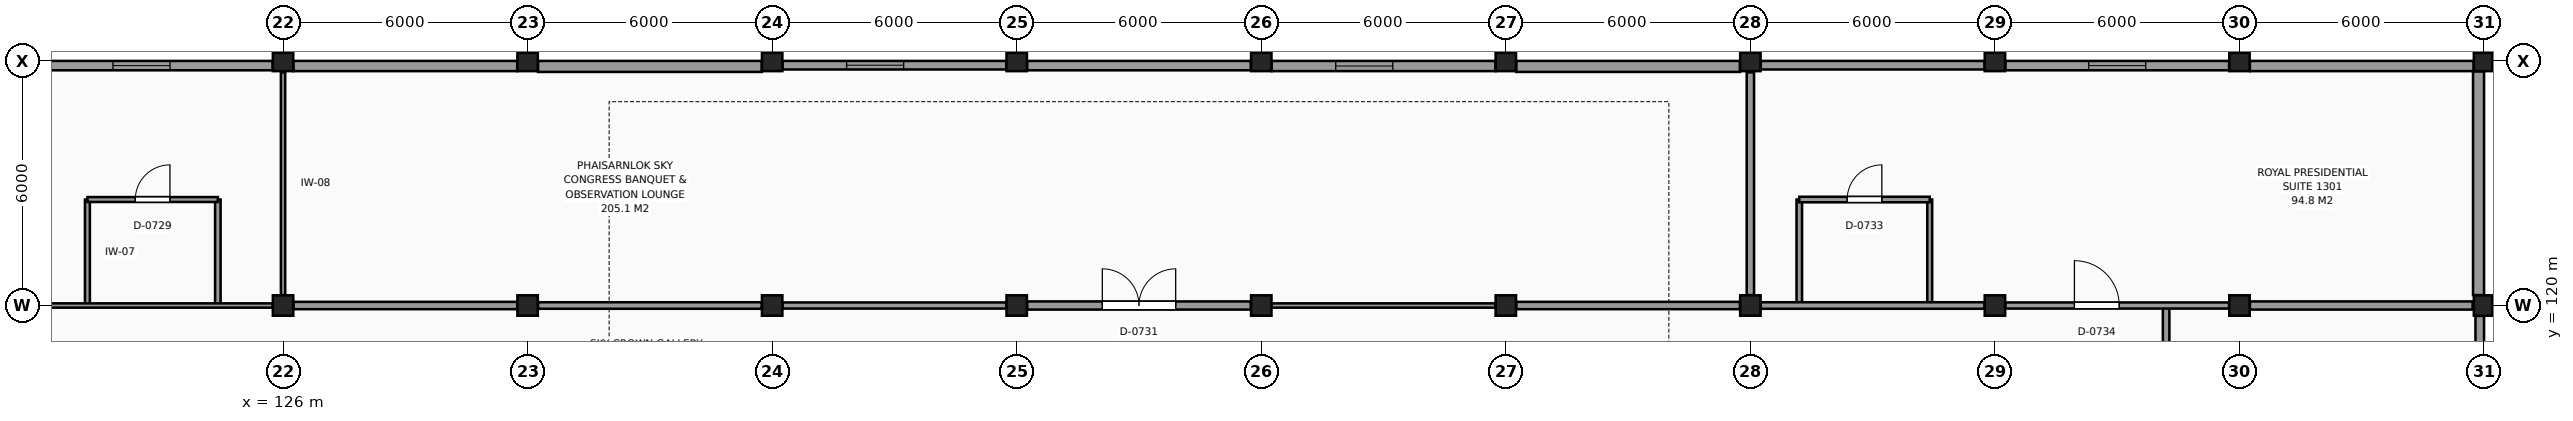
"""IFC4 building model, lengths in metres.
Left out: names, types, materials, properties, quantities, classifications, styles, units other than length and angle.
Written with IfcOpenShell. Run it as: python <this file> out.ifc"""

import sys

from ifc_helpers import new_model, si_unit, direction, frame, frame_2d, origin, origin_2d, place, context, subcontext, project, spatial, rectangle, extrude, element, fill, save


model = new_model("IFC4")
c1 = context("Model", 3, precision=1e-05, world=origin(), true_north=direction((0.0, 1.0)))
c2 = subcontext(c1, "Body", "Model", "MODEL_VIEW")
j1 = project(units=[si_unit("LENGTHUNIT", "METRE"), si_unit("PLANEANGLEUNIT", "RADIAN")], contexts=[c1])
p1 = place(None, origin())
s1 = spatial("IfcSite", under=j1, at=p1, CompositionType="ELEMENT")
p2 = place(p1, origin())
s2 = spatial("IfcBuilding", under=s1, at=p2, CompositionType="ELEMENT")
p3 = place(p2, frame((0.0, 0.0, 51.3)))
s3 = spatial("IfcBuildingStorey", under=s2, at=p3, CompositionType="ELEMENT", Elevation=51.3)
for number, where, z_axis, x_axis in (
    (1, (126.0, 120.0, 0.0), (0.0, 0.0, 1.0), (1.0, 0.0, 0.0)),
    (2, (126.0, 126.0, 0.0), (0.0, 0.0, 1.0), (1.0, 0.0, 0.0)),
    (3, (132.0, 120.0, 0.0), (0.0, 0.0, 1.0), (1.0, 0.0, 0.0)),
    (4, (132.0, 126.0, 0.0), (0.0, 0.0, 1.0), (1.0, 0.0, 0.0)),
    (5, (138.0, 120.0, 0.0), (0.0, 0.0, 1.0), (1.0, 0.0, 0.0)),
    (6, (138.0, 126.0, 0.0), (0.0, 0.0, 1.0), (1.0, 0.0, 0.0)),
    (7, (144.0, 120.0, 0.0), (0.0, 0.0, 1.0), (1.0, 0.0, 0.0)),
    (8, (144.0, 126.0, 0.0), (0.0, 0.0, 1.0), (1.0, 0.0, 0.0)),
    (9, (150.0, 120.0, 0.0), (0.0, 0.0, 1.0), (1.0, 0.0, 0.0)),
    (10, (150.0, 126.0, 0.0), (0.0, 0.0, 1.0), (1.0, 0.0, 0.0)),
    (11, (156.0, 120.0, 0.0), (0.0, 0.0, 1.0), (1.0, 0.0, 0.0)),
    (12, (156.0, 126.0, 0.0), (0.0, 0.0, 1.0), (1.0, 0.0, 0.0)),
    (13, (162.0, 120.0, 0.0), (0.0, 0.0, 1.0), (1.0, 0.0, 0.0)),
    (14, (162.0, 126.0, 0.0), (0.0, 0.0, 1.0), (1.0, 0.0, 0.0)),
    (15, (168.0, 120.0, 0.0), (0.0, 0.0, 1.0), (1.0, 0.0, 0.0)),
    (16, (168.0, 126.0, 0.0), (0.0, 0.0, 1.0), (1.0, 0.0, 0.0)),
    (17, (174.0, 120.0, 0.0), (0.0, 0.0, 1.0), (1.0, 0.0, 0.0)),
    (18, (174.0, 126.0, 0.0), (0.0, 0.0, 1.0), (1.0, 0.0, 0.0)),
    (19, (180.0, 120.0, 0.0), (0.0, 0.0, 1.0), (1.0, 0.0, 0.0)),
    (20, (180.0, 126.0, 0.0), (0.0, 0.0, 1.0), (1.0, 0.0, 0.0)),
):
    element("IfcColumn", number, at=place(p3, frame(where, z_axis=z_axis, x_axis=x_axis)), inside=s3, PredefinedType="COLUMN", context=c2, shape_type="SweptSolid", body=[
        extrude(rectangle(XDim=0.5, YDim=0.5, at=origin_2d()), origin(), (0.0, 0.0, 1.0), 3.3),
    ])
p4 = place(p3, frame((179.895, 114.255, 0.0), z_axis=(0.0, 0.0, 1.0), x_axis=(0.0, 1.0, 0.0)))
e21 = element("IfcWall", 21, at=p4, inside=s3, PredefinedType="SOLIDWALL", context=c2, shape_type="SweptSolid", body=[
    extrude(rectangle(XDim=5.49, YDim=0.21, at=frame_2d((2.745, 0.0))), origin(), (0.0, 0.0, 1.0), 2.61),
])
p5 = place(p3, frame((179.865, 120.255, 0.0), z_axis=(0.0, 0.0, 1.0), x_axis=(0.0, 1.0, 0.0)))
e22 = element("IfcWall", 22, at=p5, inside=s3, PredefinedType="SOLIDWALL", context=c2, shape_type="SweptSolid", body=[
    extrude(rectangle(XDim=5.49, YDim=0.27, at=frame_2d((2.745, 0.0))), origin(), (0.0, 0.0, 1.0), 2.46),
])
p6 = place(p3, frame((179.745, 125.875, 0.0), z_axis=(0.0, 0.0, 1.0), x_axis=(-1.0, 0.0, 0.0)))
e23 = element("IfcWall", 23, at=p6, inside=s3, PredefinedType="SOLIDWALL", context=c2, shape_type="SweptSolid", body=[
    extrude(rectangle(XDim=5.49, YDim=0.25, at=frame_2d((2.745, 0.0))), origin(), (0.0, 0.0, 1.0), 2.62),
])
p7 = place(p3, frame((173.745, 125.885, 0.0), z_axis=(0.0, 0.0, 1.0), x_axis=(-1.0, 0.0, 0.0)))
e24 = element("IfcWall", 24, at=p7, inside=s3, PredefinedType="SOLIDWALL", context=c2, shape_type="SweptSolid", body=[
    extrude(rectangle(XDim=5.49, YDim=0.23, at=frame_2d((2.745, 0.0))), origin(), (0.0, 0.0, 1.0), 2.51),
])
p8 = place(p7, frame((2.045, 0.0, 0.8)))
e25 = element("IfcOpeningElement", 25, at=p8, cuts=e24, PredefinedType="OPENING", context=c2, shape_type="SweptSolid", body=[
    extrude(rectangle(XDim=1.4, YDim=1.4, at=frame_2d((0.7, 0.7))), frame((0.0, 0.125, 0.0), z_axis=(0.0, -1.0, 0.0), x_axis=(1.0, 0.0, 0.0)), (0.0, 0.0, 1.0), 0.25),
])
p9 = place(p3, frame((167.745, 125.895, 0.0), z_axis=(0.0, 0.0, 1.0), x_axis=(-1.0, 0.0, 0.0)))
e26 = element("IfcWall", 26, at=p9, inside=s3, PredefinedType="SOLIDWALL", context=c2, shape_type="SweptSolid", body=[
    extrude(rectangle(XDim=5.49, YDim=0.21, at=frame_2d((2.745, 0.0))), origin(), (0.0, 0.0, 1.0), 2.62),
])
p10 = place(p3, frame((161.745, 125.865, 0.0), z_axis=(0.0, 0.0, 1.0), x_axis=(-1.0, 0.0, 0.0)))
e27 = element("IfcWall", 27, at=p10, inside=s3, PredefinedType="SOLIDWALL", context=c2, shape_type="SweptSolid", body=[
    extrude(rectangle(XDim=5.49, YDim=0.27, at=frame_2d((2.745, 0.0))), origin(), (0.0, 0.0, 1.0), 2.51),
])
p11 = place(p3, frame((155.745, 125.875, 0.0), z_axis=(0.0, 0.0, 1.0), x_axis=(-1.0, 0.0, 0.0)))
e28 = element("IfcWall", 28, at=p11, inside=s3, PredefinedType="SOLIDWALL", context=c2, shape_type="SweptSolid", body=[
    extrude(rectangle(XDim=5.49, YDim=0.25, at=frame_2d((2.745, 0.0))), origin(), (0.0, 0.0, 1.0), 2.62),
])
p12 = place(p11, frame((2.518, 0.0, 0.8)))
e29 = element("IfcOpeningElement", 29, at=p12, cuts=e28, PredefinedType="OPENING", context=c2, shape_type="SweptSolid", body=[
    extrude(rectangle(XDim=1.4, YDim=1.4, at=frame_2d((0.7, 0.7))), frame((0.0, 0.135, 0.0), z_axis=(0.0, -1.0, 0.0), x_axis=(1.0, 0.0, 0.0)), (0.0, 0.0, 1.0), 0.27),
])
p13 = place(p3, frame((149.745, 125.885, 0.0), z_axis=(0.0, 0.0, 1.0), x_axis=(-1.0, 0.0, 0.0)))
e30 = element("IfcWall", 30, at=p13, inside=s3, PredefinedType="SOLIDWALL", context=c2, shape_type="SweptSolid", body=[
    extrude(rectangle(XDim=5.49, YDim=0.23, at=frame_2d((2.745, 0.0))), origin(), (0.0, 0.0, 1.0), 2.51),
])
p14 = place(p3, frame((143.745, 125.895, 0.0), z_axis=(0.0, 0.0, 1.0), x_axis=(-1.0, 0.0, 0.0)))
e31 = element("IfcWall", 31, at=p14, inside=s3, PredefinedType="SOLIDWALL", context=c2, shape_type="SweptSolid", body=[
    extrude(rectangle(XDim=5.49, YDim=0.21, at=frame_2d((2.745, 0.0))), origin(), (0.0, 0.0, 1.0), 2.62),
])
p15 = place(p14, frame((2.518, 0.0, 0.8)))
e32 = element("IfcOpeningElement", 32, at=p15, cuts=e31, PredefinedType="OPENING", context=c2, shape_type="SweptSolid", body=[
    extrude(rectangle(XDim=1.4, YDim=1.4, at=frame_2d((0.7, 0.7))), frame((0.0, 0.115, 0.0), z_axis=(0.0, -1.0, 0.0), x_axis=(1.0, 0.0, 0.0)), (0.0, 0.0, 1.0), 0.23),
])
p16 = place(p3, frame((137.745, 125.865, 0.0), z_axis=(0.0, 0.0, 1.0), x_axis=(-1.0, 0.0, 0.0)))
e33 = element("IfcWall", 33, at=p16, inside=s3, PredefinedType="SOLIDWALL", context=c2, shape_type="SweptSolid", body=[
    extrude(rectangle(XDim=5.49, YDim=0.27, at=frame_2d((2.745, 0.0))), origin(), (0.0, 0.0, 1.0), 2.51),
])
p17 = place(p3, frame((131.745, 125.875, 0.0), z_axis=(0.0, 0.0, 1.0), x_axis=(-1.0, 0.0, 0.0)))
e34 = element("IfcWall", 34, at=p17, inside=s3, PredefinedType="SOLIDWALL", context=c2, shape_type="SweptSolid", body=[
    extrude(rectangle(XDim=5.49, YDim=0.25, at=frame_2d((2.745, 0.0))), origin(), (0.0, 0.0, 1.0), 2.62),
])
p18 = place(p3, frame((125.745, 125.885, 0.0), z_axis=(0.0, 0.0, 1.0), x_axis=(-1.0, 0.0, 0.0)))
e35 = element("IfcWall", 35, at=p18, inside=s3, PredefinedType="SOLIDWALL", context=c2, shape_type="SweptSolid", body=[
    extrude(rectangle(XDim=5.49, YDim=0.23, at=frame_2d((2.745, 0.0))), origin(), (0.0, 0.0, 1.0), 2.51),
])
p19 = place(p18, frame((2.518, 0.0, 0.8)))
e36 = element("IfcOpeningElement", 36, at=p19, cuts=e35, PredefinedType="OPENING", context=c2, shape_type="SweptSolid", body=[
    extrude(rectangle(XDim=1.4, YDim=1.4, at=frame_2d((0.7, 0.7))), frame((0.0, 0.125, 0.0), z_axis=(0.0, -1.0, 0.0), x_axis=(1.0, 0.0, 0.0)), (0.0, 0.0, 1.0), 0.25),
])
p20 = place(p3, frame((121.2, 120.0, 0.0), z_axis=(0.0, 0.0, 1.0), x_axis=(0.0, 1.0, 0.0)))
e37 = element("IfcWall", 37, at=p20, inside=s3, PredefinedType="PARTITIONING", context=c2, shape_type="SweptSolid", body=[
    extrude(rectangle(XDim=2.6, YDim=0.12, at=frame_2d((1.3, 0.0))), origin(), (0.0, 0.0, 1.0), 3.06),
])
p21 = place(p3, frame((124.4, 120.0, 0.0), z_axis=(0.0, 0.0, 1.0), x_axis=(0.0, 1.0, 0.0)))
e38 = element("IfcWall", 38, at=p21, inside=s3, PredefinedType="PARTITIONING", context=c2, shape_type="SweptSolid", body=[
    extrude(rectangle(XDim=2.6, YDim=0.135, at=frame_2d((1.3, 0.0))), origin(), (0.0, 0.0, 1.0), 3.06),
])
p22 = place(p3, frame((126.0, 120.255, 0.0), z_axis=(0.0, 0.0, 1.0), x_axis=(0.0, 1.0, 0.0)))
e39 = element("IfcWall", 39, at=p22, inside=s3, PredefinedType="PARTITIONING", context=c2, shape_type="SweptSolid", body=[
    extrude(rectangle(XDim=5.465, YDim=0.105, at=frame_2d((2.732, 0.0))), origin(), (0.0, 0.0, 1.0), 2.46),
])
p23 = place(p3, frame((162.0, 120.255, 0.0), z_axis=(0.0, 0.0, 1.0), x_axis=(0.0, 1.0, 0.0)))
e40 = element("IfcWall", 40, at=p23, inside=s3, PredefinedType="PARTITIONING", context=c2, shape_type="SweptSolid", body=[
    extrude(rectangle(XDim=5.465, YDim=0.18, at=frame_2d((2.732, 0.0))), origin(), (0.0, 0.0, 1.0), 2.46),
])
p24 = place(p3, frame((163.2, 120.0, 0.0), z_axis=(0.0, 0.0, 1.0), x_axis=(0.0, 1.0, 0.0)))
e41 = element("IfcWall", 41, at=p24, inside=s3, PredefinedType="PARTITIONING", context=c2, shape_type="SweptSolid", body=[
    extrude(rectangle(XDim=2.6, YDim=0.135, at=frame_2d((1.3, 0.0))), origin(), (0.0, 0.0, 1.0), 3.06),
])
p25 = place(p3, frame((166.4, 120.0, 0.0), z_axis=(0.0, 0.0, 1.0), x_axis=(0.0, 1.0, 0.0)))
e42 = element("IfcWall", 42, at=p25, inside=s3, PredefinedType="PARTITIONING", context=c2, shape_type="SweptSolid", body=[
    extrude(rectangle(XDim=2.6, YDim=0.12, at=frame_2d((1.3, 0.0))), origin(), (0.0, 0.0, 1.0), 3.06),
])
p26 = place(p3, frame((172.2, 113.56, 0.0), z_axis=(0.0, 0.0, 1.0), x_axis=(0.0, 1.0, 0.0)))
e43 = element("IfcWall", 43, at=p26, inside=s3, PredefinedType="PARTITIONING", context=c2, shape_type="SweptSolid", body=[
    extrude(rectangle(XDim=6.44, YDim=0.16, at=frame_2d((3.22, 0.0))), origin(), (0.0, 0.0, 1.0), 3.06),
])
p27 = place(p3, frame((120.255, 120.0, 0.0), z_axis=(0.0, 0.0, 1.0), x_axis=(1.0, 0.0, 0.0)))
e44 = element("IfcWall", 44, at=p27, inside=s3, PredefinedType="PARTITIONING", context=c2, shape_type="SweptSolid", body=[
    extrude(rectangle(XDim=5.49, YDim=0.105, at=frame_2d((2.745, 0.0))), origin(), (0.0, 0.0, 1.0), 2.51),
])
p28 = place(p3, frame((126.255, 120.0, 0.0), z_axis=(0.0, 0.0, 1.0), x_axis=(1.0, 0.0, 0.0)))
e45 = element("IfcWall", 45, at=p28, inside=s3, PredefinedType="PARTITIONING", context=c2, shape_type="SweptSolid", body=[
    extrude(rectangle(XDim=5.49, YDim=0.18, at=frame_2d((2.745, 0.0))), origin(), (0.0, 0.0, 1.0), 2.62),
])
p29 = place(p3, frame((132.255, 120.0, 0.0), z_axis=(0.0, 0.0, 1.0), x_axis=(1.0, 0.0, 0.0)))
e46 = element("IfcWall", 46, at=p29, inside=s3, PredefinedType="PARTITIONING", context=c2, shape_type="SweptSolid", body=[
    extrude(rectangle(XDim=5.49, YDim=0.16, at=frame_2d((2.745, 0.0))), origin(), (0.0, 0.0, 1.0), 2.51),
])
p30 = place(p3, frame((138.255, 120.0, 0.0), z_axis=(0.0, 0.0, 1.0), x_axis=(1.0, 0.0, 0.0)))
e47 = element("IfcWall", 47, at=p30, inside=s3, PredefinedType="PARTITIONING", context=c2, shape_type="SweptSolid", body=[
    extrude(rectangle(XDim=5.49, YDim=0.15, at=frame_2d((2.745, 0.0))), origin(), (0.0, 0.0, 1.0), 2.62),
])
p31 = place(p3, frame((144.255, 120.0, 0.0), z_axis=(0.0, 0.0, 1.0), x_axis=(1.0, 0.0, 0.0)))
e48 = element("IfcWall", 48, at=p31, inside=s3, PredefinedType="PARTITIONING", context=c2, shape_type="SweptSolid", body=[
    extrude(rectangle(XDim=5.49, YDim=0.2, at=frame_2d((2.745, 0.0))), origin(), (0.0, 0.0, 1.0), 2.51),
])
p32 = place(p31, frame((1.845, 0.0, 0.0)))
e49 = element("IfcOpeningElement", 49, at=p32, cuts=e48, PredefinedType="OPENING", context=c2, shape_type="SweptSolid", body=[
    extrude(rectangle(XDim=1.8, YDim=2.35, at=frame_2d((0.9, 1.175))), frame((0.0, 0.11, 0.0), z_axis=(0.0, -1.0, 0.0), x_axis=(1.0, 0.0, 0.0)), (0.0, 0.0, 1.0), 0.22),
])
p33 = place(p3, frame((150.255, 120.0, 0.0), z_axis=(0.0, 0.0, 1.0), x_axis=(1.0, 0.0, 0.0)))
e50 = element("IfcWall", 50, at=p33, inside=s3, PredefinedType="PARTITIONING", context=c2, shape_type="SweptSolid", body=[
    extrude(rectangle(XDim=5.49, YDim=0.105, at=frame_2d((2.745, 0.0))), origin(), (0.0, 0.0, 1.0), 2.62),
])
p34 = place(p3, frame((156.255, 120.0, 0.0), z_axis=(0.0, 0.0, 1.0), x_axis=(1.0, 0.0, 0.0)))
e51 = element("IfcWall", 51, at=p34, inside=s3, PredefinedType="PARTITIONING", context=c2, shape_type="SweptSolid", body=[
    extrude(rectangle(XDim=5.49, YDim=0.18, at=frame_2d((2.745, 0.0))), origin(), (0.0, 0.0, 1.0), 2.51),
])
p35 = place(p3, frame((162.255, 120.0, 0.0), z_axis=(0.0, 0.0, 1.0), x_axis=(1.0, 0.0, 0.0)))
e52 = element("IfcWall", 52, at=p35, inside=s3, PredefinedType="PARTITIONING", context=c2, shape_type="SweptSolid", body=[
    extrude(rectangle(XDim=5.49, YDim=0.16, at=frame_2d((2.745, 0.0))), origin(), (0.0, 0.0, 1.0), 2.62),
])
p36 = place(p3, frame((168.255, 120.0, 0.0), z_axis=(0.0, 0.0, 1.0), x_axis=(1.0, 0.0, 0.0)))
e53 = element("IfcWall", 53, at=p36, inside=s3, PredefinedType="PARTITIONING", context=c2, shape_type="SweptSolid", body=[
    extrude(rectangle(XDim=5.49, YDim=0.15, at=frame_2d((2.745, 0.0))), origin(), (0.0, 0.0, 1.0), 2.51),
])
p37 = place(p36, frame((1.695, 0.0, 0.0)))
e54 = element("IfcOpeningElement", 54, at=p37, cuts=e53, PredefinedType="OPENING", context=c2, shape_type="SweptSolid", body=[
    extrude(rectangle(XDim=1.1, YDim=2.2, at=frame_2d((0.55, 1.1))), frame((0.0, 0.085, 0.0), z_axis=(0.0, -1.0, 0.0), x_axis=(1.0, 0.0, 0.0)), (0.0, 0.0, 1.0), 0.17),
])
p38 = place(p3, frame((174.255, 120.0, 0.0), z_axis=(0.0, 0.0, 1.0), x_axis=(1.0, 0.0, 0.0)))
e55 = element("IfcWall", 55, at=p38, inside=s3, PredefinedType="PARTITIONING", context=c2, shape_type="SweptSolid", body=[
    extrude(rectangle(XDim=5.465, YDim=0.2, at=frame_2d((2.732, 0.0))), origin(), (0.0, 0.0, 1.0), 2.62),
])
p39 = place(p3, frame((121.2, 122.6, 0.0), z_axis=(0.0, 0.0, 1.0), x_axis=(1.0, 0.0, 0.0)))
e56 = element("IfcWall", 56, at=p39, inside=s3, PredefinedType="PARTITIONING", context=c2, shape_type="SweptSolid", body=[
    extrude(rectangle(XDim=3.2, YDim=0.12, at=frame_2d((1.6, 0.0))), origin(), (0.0, 0.0, 1.0), 3.06),
])
p40 = place(p39, frame((1.175, 0.0, 0.0)))
e57 = element("IfcOpeningElement", 57, at=p40, cuts=e56, PredefinedType="OPENING", context=c2, shape_type="SweptSolid", body=[
    extrude(rectangle(XDim=0.85, YDim=2.1, at=frame_2d((0.425, 1.05))), frame((0.0, 0.07, 0.0), z_axis=(0.0, -1.0, 0.0), x_axis=(1.0, 0.0, 0.0)), (0.0, 0.0, 1.0), 0.14),
])
p41 = place(p3, frame((163.2, 122.6, 0.0), z_axis=(0.0, 0.0, 1.0), x_axis=(1.0, 0.0, 0.0)))
e58 = element("IfcWall", 58, at=p41, inside=s3, PredefinedType="PARTITIONING", context=c2, shape_type="SweptSolid", body=[
    extrude(rectangle(XDim=3.2, YDim=0.135, at=frame_2d((1.6, 0.0))), origin(), (0.0, 0.0, 1.0), 3.06),
])
p42 = place(p41, frame((1.175, 0.0, 0.0)))
e59 = element("IfcOpeningElement", 59, at=p42, cuts=e58, PredefinedType="OPENING", context=c2, shape_type="SweptSolid", body=[
    extrude(rectangle(XDim=0.85, YDim=2.1, at=frame_2d((0.425, 1.05))), frame((0.0, 0.078, 0.0), z_axis=(0.0, -1.0, 0.0), x_axis=(1.0, 0.0, 0.0)), (0.0, 0.0, 1.0), 0.155),
])
p43 = place(p19, origin())
e60 = element("IfcWindow", 60, at=p43, inside=s3, PartitioningType="SINGLE_PANEL", PredefinedType="WINDOW", context=c2, shape_type="SweptSolid", body=[
    extrude(rectangle(XDim=1.4, YDim=1.4, at=frame_2d((0.7, 0.7))), frame((0.0, 0.03, 0.0), z_axis=(0.0, -1.0, 0.0), x_axis=(1.0, 0.0, 0.0)), (0.0, 0.0, 1.0), 0.06),
])
fill(e36, e60)
p44 = place(p15, origin())
e61 = element("IfcWindow", 61, at=p44, inside=s3, PartitioningType="SINGLE_PANEL", PredefinedType="WINDOW", context=c2, shape_type="SweptSolid", body=[
    extrude(rectangle(XDim=1.4, YDim=1.4, at=frame_2d((0.7, 0.7))), frame((0.0, 0.03, 0.0), z_axis=(0.0, -1.0, 0.0), x_axis=(1.0, 0.0, 0.0)), (0.0, 0.0, 1.0), 0.06),
])
fill(e32, e61)
p45 = place(p12, origin())
e62 = element("IfcWindow", 62, at=p45, inside=s3, PartitioningType="SINGLE_PANEL", PredefinedType="WINDOW", context=c2, shape_type="SweptSolid", body=[
    extrude(rectangle(XDim=1.4, YDim=1.4, at=frame_2d((0.7, 0.7))), frame((0.0, 0.03, 0.0), z_axis=(0.0, -1.0, 0.0), x_axis=(1.0, 0.0, 0.0)), (0.0, 0.0, 1.0), 0.06),
])
fill(e29, e62)
p46 = place(p8, origin())
e63 = element("IfcWindow", 63, at=p46, inside=s3, PartitioningType="SINGLE_PANEL", PredefinedType="WINDOW", context=c2, shape_type="SweptSolid", body=[
    extrude(rectangle(XDim=1.4, YDim=1.4, at=frame_2d((0.7, 0.7))), frame((0.0, 0.03, 0.0), z_axis=(0.0, -1.0, 0.0), x_axis=(1.0, 0.0, 0.0)), (0.0, 0.0, 1.0), 0.06),
])
fill(e25, e63)
p47 = place(p40, origin())
e64 = element("IfcDoor", 64, at=p47, inside=s3, OperationType="SINGLE_SWING_RIGHT", PredefinedType="DOOR", context=c2, shape_type="SweptSolid", body=[
    extrude(rectangle(XDim=0.85, YDim=2.1, at=frame_2d((0.425, 1.05))), frame((0.0, 0.025, 0.0), z_axis=(0.0, -1.0, 0.0), x_axis=(1.0, 0.0, 0.0)), (0.0, 0.0, 1.0), 0.05),
])
fill(e57, e64)
p48 = place(p32, origin())
e65 = element("IfcDoor", 65, at=p48, inside=s3, OperationType="DOUBLE_DOOR_SINGLE_SWING", PredefinedType="DOOR", context=c2, shape_type="SweptSolid", body=[
    extrude(rectangle(XDim=1.8, YDim=2.35, at=frame_2d((0.9, 1.175))), frame((0.0, 0.025, 0.0), z_axis=(0.0, -1.0, 0.0), x_axis=(1.0, 0.0, 0.0)), (0.0, 0.0, 1.0), 0.05),
])
fill(e49, e65)
p49 = place(p42, origin())
e66 = element("IfcDoor", 66, at=p49, inside=s3, OperationType="SINGLE_SWING_RIGHT", PredefinedType="DOOR", context=c2, shape_type="SweptSolid", body=[
    extrude(rectangle(XDim=0.85, YDim=2.1, at=frame_2d((0.425, 1.05))), frame((0.0, 0.025, 0.0), z_axis=(0.0, -1.0, 0.0), x_axis=(1.0, 0.0, 0.0)), (0.0, 0.0, 1.0), 0.05),
])
fill(e59, e66)
p50 = place(p37, origin())
e67 = element("IfcDoor", 67, at=p50, inside=s3, OperationType="SINGLE_SWING_LEFT", PredefinedType="DOOR", context=c2, shape_type="SweptSolid", body=[
    extrude(rectangle(XDim=1.1, YDim=2.2, at=frame_2d((0.55, 1.1))), frame((0.0, 0.025, 0.0), z_axis=(0.0, -1.0, 0.0), x_axis=(1.0, 0.0, 0.0)), (0.0, 0.0, 1.0), 0.05),
])
fill(e54, e67)
save(model, sys.argv[1])
